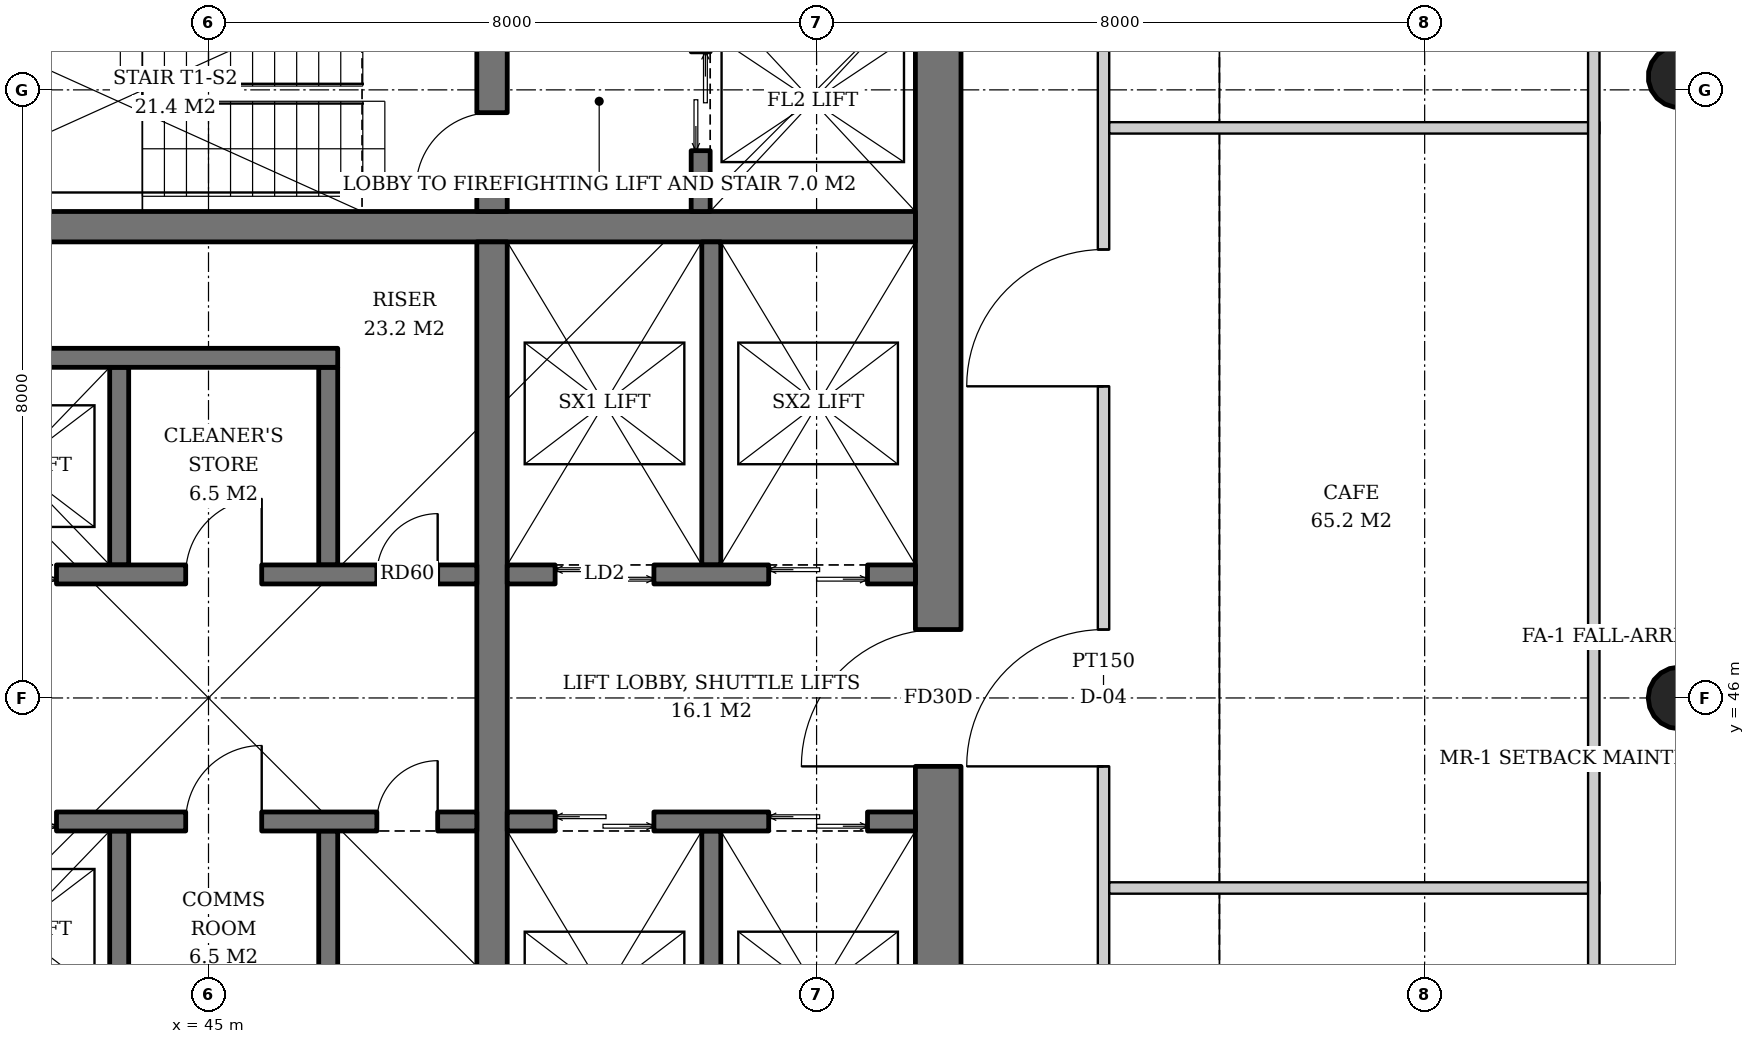
"""IFC4 building model, lengths in metres.
Left out: names, types, materials, properties, quantities, classifications, styles, units other than length and angle.
Written with IfcOpenShell. Run it as: python <this file> out.ifc"""

import sys

from ifc_helpers import new_model, si_unit, direction, frame, frame_2d, origin, origin_2d, place, context, subcontext, project, spatial, rectangle, hollow_circle, extrude, element, fill, save


model = new_model("IFC4")
c1 = context("Model", 3, precision=1e-05, world=origin(), true_north=direction((0.0, 1.0)))
c2 = subcontext(c1, "Body", "Model", "MODEL_VIEW")
j1 = project(units=[si_unit("LENGTHUNIT", "METRE"), si_unit("PLANEANGLEUNIT", "RADIAN")], contexts=[c1])
p1 = place(None, origin())
s1 = spatial("IfcSite", under=j1, at=p1, CompositionType="ELEMENT")
p2 = place(p1, origin())
s2 = spatial("IfcBuilding", under=s1, at=p2, CompositionType="ELEMENT")
p3 = place(p2, frame((0.0, 0.0, 165.4)))
s3 = spatial("IfcBuildingStorey", under=s2, at=p3, CompositionType="ELEMENT", Elevation=165.4)
p4 = place(p3, frame((64.386, 46.0, 0.0), z_axis=(-0.031914348339, 0.0, 0.999490607445), x_axis=(0.0, -1.0, 0.0)))
e1 = element("IfcColumn", 1, at=p4, inside=s3, PredefinedType="COLUMN", context=c2, shape_type="SweptSolid", body=[
    extrude(hollow_circle(Radius=0.406, WallThickness=0.03, at=origin_2d()), origin(), (0.0, 0.0, 1.0), 3.802),
])
p5 = place(p3, frame((64.386, 54.193, 0.0), z_axis=(-0.031910269556, -0.015987237665, 0.999362868496), x_axis=(0.447933021895, -0.894067115991, 0.0)))
e2 = element("IfcColumn", 2, at=p5, inside=s3, PredefinedType="COLUMN", context=c2, shape_type="SweptSolid", body=[
    extrude(hollow_circle(Radius=0.406, WallThickness=0.03, at=origin_2d()), origin(), (0.0, 0.0, 1.0), 3.802),
])
p6 = place(p3, frame((54.6, 36.7, 0.0), z_axis=(0.0, 0.0, 1.0), x_axis=(0.0, 1.0, 0.0)))
e3 = element("IfcWall", 3, at=p6, inside=s3, PredefinedType="SHEAR", context=c2, shape_type="SweptSolid", body=[
    extrude(rectangle(XDim=18.6, YDim=0.6, at=frame_2d((9.3, 0.0))), origin(), (0.0, 0.0, 1.0), 3.8),
])
p7 = place(p6, frame((8.4, 0.0, 0.0)))
e4 = element("IfcOpeningElement", 4, at=p7, cuts=e3, PredefinedType="OPENING", context=c2, shape_type="SweptSolid", body=[
    extrude(rectangle(XDim=1.8, YDim=2.4, at=frame_2d((0.9, 1.2))), frame((0.0, 0.31, 0.0), z_axis=(0.0, -1.0, 0.0), x_axis=(1.0, 0.0, 0.0)), (0.0, 0.0, 1.0), 0.62),
])
p8 = place(p3, frame((35.7, 52.2, 0.0), z_axis=(0.0, 0.0, 1.0), x_axis=(1.0, 0.0, 0.0)))
e5 = element("IfcWall", 5, at=p8, inside=s3, PredefinedType="SHEAR", context=c2, shape_type="SweptSolid", body=[
    extrude(rectangle(XDim=18.6, YDim=0.4, at=frame_2d((9.3, 0.0))), origin(), (0.0, 0.0, 1.0), 3.8),
])
p9 = place(p3, frame((48.73, 40.0, 0.0), z_axis=(0.0, 0.0, 1.0), x_axis=(0.0, 1.0, 0.0)))
e6 = element("IfcWall", 6, at=p9, inside=s3, PredefinedType="SHEAR", context=c2, shape_type="SweptSolid", body=[
    extrude(rectangle(XDim=12.0, YDim=0.4, at=frame_2d((6.0, 0.0))), origin(), (0.0, 0.0, 1.0), 3.8),
])
p10 = place(p3, frame((48.73, 52.4, 0.0), z_axis=(0.0, 0.0, 1.0), x_axis=(0.0, 1.0, 0.0)))
e7 = element("IfcWall", 7, at=p10, inside=s3, PredefinedType="SHEAR", context=c2, shape_type="SweptSolid", body=[
    extrude(rectangle(XDim=2.9, YDim=0.4, at=frame_2d((1.45, 0.0))), origin(), (0.0, 0.0, 1.0), 3.8),
])
p11 = place(p10, frame((0.3, 0.0, 0.0)))
e8 = element("IfcOpeningElement", 8, at=p11, cuts=e7, PredefinedType="OPENING", context=c2, shape_type="SweptSolid", body=[
    extrude(rectangle(XDim=1.0, YDim=2.1, at=frame_2d((0.5, 1.05))), frame((0.0, 0.21, 0.0), z_axis=(0.0, -1.0, 0.0), x_axis=(1.0, 0.0, 0.0)), (0.0, 0.0, 1.0), 0.42),
])
p12 = place(p3, frame((51.475, 52.4, 0.0), z_axis=(0.0, 0.0, 1.0), x_axis=(0.0, 1.0, 0.0)))
e9 = element("IfcWall", 9, at=p12, inside=s3, PredefinedType="SHEAR", context=c2, shape_type="SweptSolid", body=[
    extrude(rectangle(XDim=2.9, YDim=0.25, at=frame_2d((1.45, 0.0))), origin(), (0.0, 0.0, 1.0), 3.8),
])
p13 = place(p12, frame((0.8, 0.0, 0.0)))
e10 = element("IfcOpeningElement", 10, at=p13, cuts=e9, PredefinedType="OPENING", context=c2, shape_type="SweptSolid", body=[
    extrude(rectangle(XDim=1.3, YDim=2.2, at=frame_2d((0.65, 1.1))), frame((0.0, 0.135, 0.0), z_axis=(0.0, -1.0, 0.0), x_axis=(1.0, 0.0, 0.0)), (0.0, 0.0, 1.0), 0.27),
])
for number, where, z_axis, x_axis in (
    (11, (43.825, 47.75, 0.0), (0.0, 0.0, 1.0), (0.0, 1.0, 0.0)),
    (12, (46.575, 47.75, 0.0), (0.0, 0.0, 1.0), (0.0, 1.0, 0.0)),
):
    element("IfcWall", number, at=place(p3, frame(where, z_axis=z_axis, x_axis=x_axis)), inside=s3, PredefinedType="SHEAR", context=c2, shape_type="SweptSolid", body=[
        extrude(rectangle(XDim=2.6, YDim=0.25, at=frame_2d((1.3, 0.0))), origin(), (0.0, 0.0, 1.0), 3.8),
    ])
p14 = place(p3, frame((35.7, 50.475, 0.0), z_axis=(0.0, 0.0, 1.0), x_axis=(1.0, 0.0, 0.0)))
e13 = element("IfcWall", 13, at=p14, inside=s3, PredefinedType="SHEAR", context=c2, shape_type="SweptSolid", body=[
    extrude(rectangle(XDim=11.0, YDim=0.25, at=frame_2d((5.5, 0.0))), origin(), (0.0, 0.0, 1.0), 3.8),
])
p15 = place(p3, frame((35.7, 47.625, 0.0), z_axis=(0.0, 0.0, 1.0), x_axis=(1.0, 0.0, 0.0)))
e14 = element("IfcWall", 14, at=p15, inside=s3, PredefinedType="SHEAR", context=c2, shape_type="SweptSolid", body=[
    extrude(rectangle(XDim=12.83, YDim=0.25, at=frame_2d((6.415, 0.0))), origin(), (0.0, 0.0, 1.0), 3.8),
])
p16 = place(p15, frame((0.7, 0.0, 0.0)))
e15 = element("IfcOpeningElement", 15, at=p16, cuts=e14, PredefinedType="OPENING", context=c2, shape_type="SweptSolid", body=[
    extrude(rectangle(XDim=1.1, YDim=2.2, at=frame_2d((0.55, 1.1))), frame((0.0, 0.135, 0.0), z_axis=(0.0, -1.0, 0.0), x_axis=(1.0, 0.0, 0.0)), (0.0, 0.0, 1.0), 0.27),
])
p17 = place(p15, frame((3.45, 0.0, 0.0)))
e16 = element("IfcOpeningElement", 16, at=p17, cuts=e14, PredefinedType="OPENING", context=c2, shape_type="SweptSolid", body=[
    extrude(rectangle(XDim=1.1, YDim=2.2, at=frame_2d((0.55, 1.1))), frame((0.0, 0.135, 0.0), z_axis=(0.0, -1.0, 0.0), x_axis=(1.0, 0.0, 0.0)), (0.0, 0.0, 1.0), 0.27),
])
p18 = place(p15, frame((6.2, 0.0, 0.0)))
e17 = element("IfcOpeningElement", 17, at=p18, cuts=e14, PredefinedType="OPENING", context=c2, shape_type="SweptSolid", body=[
    extrude(rectangle(XDim=1.1, YDim=2.2, at=frame_2d((0.55, 1.1))), frame((0.0, 0.135, 0.0), z_axis=(0.0, -1.0, 0.0), x_axis=(1.0, 0.0, 0.0)), (0.0, 0.0, 1.0), 0.27),
])
p19 = place(p15, frame((9.0, 0.0, 0.0)))
e18 = element("IfcOpeningElement", 18, at=p19, cuts=e14, PredefinedType="OPENING", context=c2, shape_type="SweptSolid", body=[
    extrude(rectangle(XDim=1.0, YDim=2.1, at=frame_2d((0.5, 1.05))), frame((0.0, 0.135, 0.0), z_axis=(0.0, -1.0, 0.0), x_axis=(1.0, 0.0, 0.0)), (0.0, 0.0, 1.0), 0.27),
])
p20 = place(p15, frame((11.515, 0.0, 0.0)))
e19 = element("IfcOpeningElement", 19, at=p20, cuts=e14, PredefinedType="OPENING", context=c2, shape_type="SweptSolid", body=[
    extrude(rectangle(XDim=0.8, YDim=2.0, at=frame_2d((0.4, 1.0))), frame((0.0, 0.135, 0.0), z_axis=(0.0, -1.0, 0.0), x_axis=(1.0, 0.0, 0.0)), (0.0, 0.0, 1.0), 0.27),
])
for number, where, z_axis, x_axis in (
    (20, (43.825, 44.25, 0.0), (0.0, 0.0, 1.0), (0.0, -1.0, 0.0)),
    (21, (46.575, 44.25, 0.0), (0.0, 0.0, 1.0), (0.0, -1.0, 0.0)),
):
    element("IfcWall", number, at=place(p3, frame(where, z_axis=z_axis, x_axis=x_axis)), inside=s3, PredefinedType="SHEAR", context=c2, shape_type="SweptSolid", body=[
        extrude(rectangle(XDim=2.6, YDim=0.25, at=frame_2d((1.3, 0.0))), origin(), (0.0, 0.0, 1.0), 3.8),
    ])
p21 = place(p3, frame((35.7, 44.375, 0.0), z_axis=(0.0, 0.0, 1.0), x_axis=(1.0, 0.0, 0.0)))
e22 = element("IfcWall", 22, at=p21, inside=s3, PredefinedType="SHEAR", context=c2, shape_type="SweptSolid", body=[
    extrude(rectangle(XDim=12.83, YDim=0.25, at=frame_2d((6.415, 0.0))), origin(), (0.0, 0.0, 1.0), 3.8),
])
p22 = place(p21, frame((0.7, 0.0, 0.0)))
e23 = element("IfcOpeningElement", 23, at=p22, cuts=e22, PredefinedType="OPENING", context=c2, shape_type="SweptSolid", body=[
    extrude(rectangle(XDim=1.1, YDim=2.2, at=frame_2d((0.55, 1.1))), frame((0.0, 0.135, 0.0), z_axis=(0.0, -1.0, 0.0), x_axis=(1.0, 0.0, 0.0)), (0.0, 0.0, 1.0), 0.27),
])
p23 = place(p21, frame((3.45, 0.0, 0.0)))
e24 = element("IfcOpeningElement", 24, at=p23, cuts=e22, PredefinedType="OPENING", context=c2, shape_type="SweptSolid", body=[
    extrude(rectangle(XDim=1.1, YDim=2.2, at=frame_2d((0.55, 1.1))), frame((0.0, 0.135, 0.0), z_axis=(0.0, -1.0, 0.0), x_axis=(1.0, 0.0, 0.0)), (0.0, 0.0, 1.0), 0.27),
])
p24 = place(p21, frame((6.2, 0.0, 0.0)))
e25 = element("IfcOpeningElement", 25, at=p24, cuts=e22, PredefinedType="OPENING", context=c2, shape_type="SweptSolid", body=[
    extrude(rectangle(XDim=1.1, YDim=2.2, at=frame_2d((0.55, 1.1))), frame((0.0, 0.135, 0.0), z_axis=(0.0, -1.0, 0.0), x_axis=(1.0, 0.0, 0.0)), (0.0, 0.0, 1.0), 0.27),
])
p25 = place(p21, frame((9.0, 0.0, 0.0)))
e26 = element("IfcOpeningElement", 26, at=p25, cuts=e22, PredefinedType="OPENING", context=c2, shape_type="SweptSolid", body=[
    extrude(rectangle(XDim=1.0, YDim=2.1, at=frame_2d((0.5, 1.05))), frame((0.0, 0.135, 0.0), z_axis=(0.0, -1.0, 0.0), x_axis=(1.0, 0.0, 0.0)), (0.0, 0.0, 1.0), 0.27),
])
p26 = place(p21, frame((11.515, 0.0, 0.0)))
e27 = element("IfcOpeningElement", 27, at=p26, cuts=e22, PredefinedType="OPENING", context=c2, shape_type="SweptSolid", body=[
    extrude(rectangle(XDim=0.8, YDim=2.0, at=frame_2d((0.4, 1.0))), frame((0.0, 0.135, 0.0), z_axis=(0.0, -1.0, 0.0), x_axis=(1.0, 0.0, 0.0)), (0.0, 0.0, 1.0), 0.27),
])
p27 = place(p3, frame((51.615, 47.75, 0.0), z_axis=(0.0, 0.0, 1.0), x_axis=(0.0, 1.0, 0.0)))
e28 = element("IfcWall", 28, at=p27, inside=s3, PredefinedType="SHEAR", context=c2, shape_type="SweptSolid", body=[
    extrude(rectangle(XDim=4.25, YDim=0.25, at=frame_2d((2.125, 0.0))), origin(), (0.0, 0.0, 1.0), 3.8),
])
p28 = place(p3, frame((48.93, 47.625, 0.0), z_axis=(0.0, 0.0, 1.0), x_axis=(1.0, 0.0, 0.0)))
e29 = element("IfcWall", 29, at=p28, inside=s3, PredefinedType="SHEAR", context=c2, shape_type="SweptSolid", body=[
    extrude(rectangle(XDim=5.37, YDim=0.25, at=frame_2d((2.685, 0.0))), origin(), (0.0, 0.0, 1.0), 3.8),
])
p29 = place(p28, frame((0.63, 0.0, 0.0)))
e30 = element("IfcOpeningElement", 30, at=p29, cuts=e29, PredefinedType="OPENING", context=c2, shape_type="SweptSolid", body=[
    extrude(rectangle(XDim=1.3, YDim=2.2, at=frame_2d((0.65, 1.1))), frame((0.0, 0.135, 0.0), z_axis=(0.0, -1.0, 0.0), x_axis=(1.0, 0.0, 0.0)), (0.0, 0.0, 1.0), 0.27),
])
p30 = place(p28, frame((3.44, 0.0, 0.0)))
e31 = element("IfcOpeningElement", 31, at=p30, cuts=e29, PredefinedType="OPENING", context=c2, shape_type="SweptSolid", body=[
    extrude(rectangle(XDim=1.3, YDim=2.2, at=frame_2d((0.65, 1.1))), frame((0.0, 0.135, 0.0), z_axis=(0.0, -1.0, 0.0), x_axis=(1.0, 0.0, 0.0)), (0.0, 0.0, 1.0), 0.27),
])
p31 = place(p3, frame((51.615, 44.25, 0.0), z_axis=(0.0, 0.0, 1.0), x_axis=(0.0, -1.0, 0.0)))
e32 = element("IfcWall", 32, at=p31, inside=s3, PredefinedType="SHEAR", context=c2, shape_type="SweptSolid", body=[
    extrude(rectangle(XDim=4.25, YDim=0.25, at=frame_2d((2.125, 0.0))), origin(), (0.0, 0.0, 1.0), 3.8),
])
p32 = place(p3, frame((48.93, 44.375, 0.0), z_axis=(0.0, 0.0, 1.0), x_axis=(1.0, 0.0, 0.0)))
e33 = element("IfcWall", 33, at=p32, inside=s3, PredefinedType="SHEAR", context=c2, shape_type="SweptSolid", body=[
    extrude(rectangle(XDim=5.37, YDim=0.25, at=frame_2d((2.685, 0.0))), origin(), (0.0, 0.0, 1.0), 3.8),
])
p33 = place(p32, frame((0.63, 0.0, 0.0)))
e34 = element("IfcOpeningElement", 34, at=p33, cuts=e33, PredefinedType="OPENING", context=c2, shape_type="SweptSolid", body=[
    extrude(rectangle(XDim=1.3, YDim=2.2, at=frame_2d((0.65, 1.1))), frame((0.0, 0.135, 0.0), z_axis=(0.0, -1.0, 0.0), x_axis=(1.0, 0.0, 0.0)), (0.0, 0.0, 1.0), 0.27),
])
p34 = place(p32, frame((3.44, 0.0, 0.0)))
e35 = element("IfcOpeningElement", 35, at=p34, cuts=e33, PredefinedType="OPENING", context=c2, shape_type="SweptSolid", body=[
    extrude(rectangle(XDim=1.3, YDim=2.2, at=frame_2d((0.65, 1.1))), frame((0.0, 0.135, 0.0), z_axis=(0.0, -1.0, 0.0), x_axis=(1.0, 0.0, 0.0)), (0.0, 0.0, 1.0), 0.27),
])
p35 = place(p3, frame((56.775, 34.15, 0.0), z_axis=(0.0, 0.0, 1.0), x_axis=(0.0, 1.0, 0.0)))
e36 = element("IfcWall", 36, at=p35, inside=s3, PredefinedType="PARTITIONING", context=c2, shape_type="SweptSolid", body=[
    extrude(rectangle(XDim=23.55, YDim=0.15, at=frame_2d((11.775, 0.0))), origin(), (0.0, 0.0, 1.0), 2.85),
])
p36 = place(p35, frame((6.35, 0.0, 0.0)))
e37 = element("IfcOpeningElement", 37, at=p36, cuts=e36, PredefinedType="OPENING", context=c2, shape_type="SweptSolid", body=[
    extrude(rectangle(XDim=1.0, YDim=2.1, at=frame_2d((0.5, 1.05))), frame((0.0, 0.085, 0.0), z_axis=(0.0, -1.0, 0.0), x_axis=(1.0, 0.0, 0.0)), (0.0, 0.0, 1.0), 0.17),
])
p37 = place(p35, frame((10.95, 0.0, 0.0)))
e38 = element("IfcOpeningElement", 38, at=p37, cuts=e36, PredefinedType="OPENING", context=c2, shape_type="SweptSolid", body=[
    extrude(rectangle(XDim=1.8, YDim=2.4, at=frame_2d((0.9, 1.2))), frame((0.0, 0.085, 0.0), z_axis=(0.0, -1.0, 0.0), x_axis=(1.0, 0.0, 0.0)), (0.0, 0.0, 1.0), 0.17),
])
p38 = place(p35, frame((15.95, 0.0, 0.0)))
e39 = element("IfcOpeningElement", 39, at=p38, cuts=e36, PredefinedType="OPENING", context=c2, shape_type="SweptSolid", body=[
    extrude(rectangle(XDim=1.8, YDim=2.4, at=frame_2d((0.9, 1.2))), frame((0.0, 0.085, 0.0), z_axis=(0.0, -1.0, 0.0), x_axis=(1.0, 0.0, 0.0)), (0.0, 0.0, 1.0), 0.17),
])
for number, where, z_axis, x_axis in (
    (40, (56.85, 43.5, 0.0), (0.0, 0.0, 1.0), (1.0, 0.0, 0.0)),
    (41, (56.85, 53.5, 0.0), (0.0, 0.0, 1.0), (1.0, 0.0, 0.0)),
):
    element("IfcWall", number, at=place(p3, frame(where, z_axis=z_axis, x_axis=x_axis)), inside=s3, PredefinedType="PARTITIONING", context=c2, shape_type="SweptSolid", body=[
        extrude(rectangle(XDim=6.45, YDim=0.15, at=frame_2d((3.225, 0.0))), origin(), (0.0, 0.0, 1.0), 3.62),
    ])
p39 = place(p3, frame((63.225, 61.3, 0.0), z_axis=(0.0, 0.0, 1.0), x_axis=(0.0, -1.0, 0.0)))
e42 = element("IfcWall", 42, at=p39, inside=s3, PredefinedType="PARTITIONING", context=c2, shape_type="SweptSolid", body=[
    extrude(rectangle(XDim=30.6, YDim=0.15, at=frame_2d((15.3, 0.0))), origin(), (0.0, 0.0, 1.0), 2.85),
])
p40 = place(p13, origin())
e43 = element("IfcDoor", 43, at=p40, inside=s3, OperationType="DOUBLE_DOOR_SLIDING", PredefinedType="DOOR", context=c2, shape_type="SweptSolid", body=[
    extrude(rectangle(XDim=1.3, YDim=2.2, at=frame_2d((0.65, 1.1))), frame((0.0, 0.025, 0.0), z_axis=(0.0, -1.0, 0.0), x_axis=(1.0, 0.0, 0.0)), (0.0, 0.0, 1.0), 0.05),
])
fill(e10, e43)
p41 = place(p18, origin())
e44 = element("IfcDoor", 44, at=p41, inside=s3, OperationType="DOUBLE_DOOR_SLIDING", PredefinedType="DOOR", context=c2, shape_type="SweptSolid", body=[
    extrude(rectangle(XDim=1.1, YDim=2.2, at=frame_2d((0.55, 1.1))), frame((0.0, 0.025, 0.0), z_axis=(0.0, -1.0, 0.0), x_axis=(1.0, 0.0, 0.0)), (0.0, 0.0, 1.0), 0.05),
])
fill(e17, e44)
p42 = place(p19, origin())
e45 = element("IfcDoor", 45, at=p42, inside=s3, OperationType="SINGLE_SWING_RIGHT", PredefinedType="DOOR", context=c2, shape_type="SweptSolid", body=[
    extrude(rectangle(XDim=1.0, YDim=2.1, at=frame_2d((0.5, 1.05))), frame((0.0, 0.025, 0.0), z_axis=(0.0, -1.0, 0.0), x_axis=(1.0, 0.0, 0.0)), (0.0, 0.0, 1.0), 0.05),
])
fill(e18, e45)
p43 = place(p20, origin())
e46 = element("IfcDoor", 46, at=p43, inside=s3, OperationType="SINGLE_SWING_RIGHT", PredefinedType="DOOR", context=c2, shape_type="SweptSolid", body=[
    extrude(rectangle(XDim=0.8, YDim=2.0, at=frame_2d((0.4, 1.0))), frame((0.0, 0.025, 0.0), z_axis=(0.0, -1.0, 0.0), x_axis=(1.0, 0.0, 0.0)), (0.0, 0.0, 1.0), 0.05),
])
fill(e19, e46)
p44 = place(p24, origin())
e47 = element("IfcDoor", 47, at=p44, inside=s3, OperationType="DOUBLE_DOOR_SLIDING", PredefinedType="DOOR", context=c2, shape_type="SweptSolid", body=[
    extrude(rectangle(XDim=1.1, YDim=2.2, at=frame_2d((0.55, 1.1))), frame((0.0, 0.025, 0.0), z_axis=(0.0, -1.0, 0.0), x_axis=(1.0, 0.0, 0.0)), (0.0, 0.0, 1.0), 0.05),
])
fill(e25, e47)
p45 = place(p25, origin())
e48 = element("IfcDoor", 48, at=p45, inside=s3, OperationType="SINGLE_SWING_RIGHT", PredefinedType="DOOR", context=c2, shape_type="SweptSolid", body=[
    extrude(rectangle(XDim=1.0, YDim=2.1, at=frame_2d((0.5, 1.05))), frame((0.0, 0.025, 0.0), z_axis=(0.0, -1.0, 0.0), x_axis=(1.0, 0.0, 0.0)), (0.0, 0.0, 1.0), 0.05),
])
fill(e26, e48)
p46 = place(p26, origin())
e49 = element("IfcDoor", 49, at=p46, inside=s3, OperationType="SINGLE_SWING_RIGHT", PredefinedType="DOOR", context=c2, shape_type="SweptSolid", body=[
    extrude(rectangle(XDim=0.8, YDim=2.0, at=frame_2d((0.4, 1.0))), frame((0.0, 0.025, 0.0), z_axis=(0.0, -1.0, 0.0), x_axis=(1.0, 0.0, 0.0)), (0.0, 0.0, 1.0), 0.05),
])
fill(e27, e49)
p47 = place(p29, origin())
e50 = element("IfcDoor", 50, at=p47, inside=s3, OperationType="DOUBLE_DOOR_SLIDING", PredefinedType="DOOR", context=c2, shape_type="SweptSolid", body=[
    extrude(rectangle(XDim=1.3, YDim=2.2, at=frame_2d((0.65, 1.1))), frame((0.0, 0.025, 0.0), z_axis=(0.0, -1.0, 0.0), x_axis=(1.0, 0.0, 0.0)), (0.0, 0.0, 1.0), 0.05),
])
fill(e30, e50)
p48 = place(p30, origin())
e51 = element("IfcDoor", 51, at=p48, inside=s3, OperationType="DOUBLE_DOOR_SLIDING", PredefinedType="DOOR", context=c2, shape_type="SweptSolid", body=[
    extrude(rectangle(XDim=1.3, YDim=2.2, at=frame_2d((0.65, 1.1))), frame((0.0, 0.025, 0.0), z_axis=(0.0, -1.0, 0.0), x_axis=(1.0, 0.0, 0.0)), (0.0, 0.0, 1.0), 0.05),
])
fill(e31, e51)
p49 = place(p33, origin())
e52 = element("IfcDoor", 52, at=p49, inside=s3, OperationType="DOUBLE_DOOR_SLIDING", PredefinedType="DOOR", context=c2, shape_type="SweptSolid", body=[
    extrude(rectangle(XDim=1.3, YDim=2.2, at=frame_2d((0.65, 1.1))), frame((0.0, 0.025, 0.0), z_axis=(0.0, -1.0, 0.0), x_axis=(1.0, 0.0, 0.0)), (0.0, 0.0, 1.0), 0.05),
])
fill(e34, e52)
p50 = place(p34, origin())
e53 = element("IfcDoor", 53, at=p50, inside=s3, OperationType="DOUBLE_DOOR_SLIDING", PredefinedType="DOOR", context=c2, shape_type="SweptSolid", body=[
    extrude(rectangle(XDim=1.3, YDim=2.2, at=frame_2d((0.65, 1.1))), frame((0.0, 0.025, 0.0), z_axis=(0.0, -1.0, 0.0), x_axis=(1.0, 0.0, 0.0)), (0.0, 0.0, 1.0), 0.05),
])
fill(e35, e53)
p51 = place(p11, origin())
e54 = element("IfcDoor", 54, at=p51, inside=s3, OperationType="SINGLE_SWING_LEFT", PredefinedType="DOOR", context=c2, shape_type="SweptSolid", body=[
    extrude(rectangle(XDim=1.0, YDim=2.1, at=frame_2d((0.5, 1.05))), frame((0.0, 0.025, 0.0), z_axis=(0.0, -1.0, 0.0), x_axis=(1.0, 0.0, 0.0)), (0.0, 0.0, 1.0), 0.05),
])
fill(e8, e54)
p52 = place(p7, origin())
e55 = element("IfcDoor", 55, at=p52, inside=s3, OperationType="DOUBLE_DOOR_SINGLE_SWING", PredefinedType="DOOR", context=c2, shape_type="SweptSolid", body=[
    extrude(rectangle(XDim=1.8, YDim=2.4, at=frame_2d((0.9, 1.2))), frame((0.0, 0.025, 0.0), z_axis=(0.0, -1.0, 0.0), x_axis=(1.0, 0.0, 0.0)), (0.0, 0.0, 1.0), 0.05),
])
fill(e4, e55)
p53 = place(p37, origin())
e56 = element("IfcDoor", 56, at=p53, inside=s3, OperationType="DOUBLE_DOOR_SINGLE_SWING", PredefinedType="DOOR", context=c2, shape_type="SweptSolid", body=[
    extrude(rectangle(XDim=1.8, YDim=2.4, at=frame_2d((0.9, 1.2))), frame((0.0, 0.025, 0.0), z_axis=(0.0, -1.0, 0.0), x_axis=(1.0, 0.0, 0.0)), (0.0, 0.0, 1.0), 0.05),
])
fill(e38, e56)
p54 = place(p38, origin())
e57 = element("IfcDoor", 57, at=p54, inside=s3, OperationType="DOUBLE_DOOR_SINGLE_SWING", PredefinedType="DOOR", context=c2, shape_type="SweptSolid", body=[
    extrude(rectangle(XDim=1.8, YDim=2.4, at=frame_2d((0.9, 1.2))), frame((0.0, 0.025, 0.0), z_axis=(0.0, -1.0, 0.0), x_axis=(1.0, 0.0, 0.0)), (0.0, 0.0, 1.0), 0.05),
])
fill(e39, e57)
save(model, sys.argv[1])
